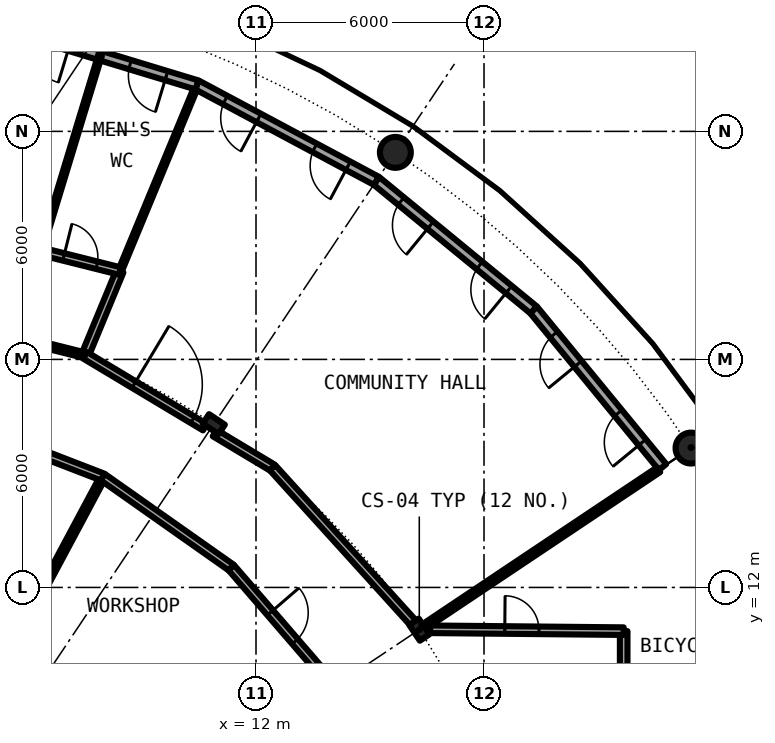
"""IFC4 building model, lengths in metres.
Left out: names, types, materials, properties, quantities, classifications, styles, units other than length and angle.
Written with IfcOpenShell. Run it as: python <this file> out.ifc"""

import sys

from ifc_helpers import new_model, si_unit, direction, frame, frame_2d, origin, origin_2d, place, context, subcontext, project, spatial, rectangle, hollow_circle, i_section, extrude, element, fill, save


model = new_model("IFC4")
c1 = context("Model", 3, precision=1e-05, world=origin(), true_north=direction((0.0, 1.0)))
c2 = subcontext(c1, "Body", "Model", "MODEL_VIEW")
j1 = project(units=[si_unit("LENGTHUNIT", "METRE"), si_unit("PLANEANGLEUNIT", "RADIAN")], contexts=[c1])
p1 = place(None, origin())
s1 = spatial("IfcSite", under=j1, at=p1, CompositionType="ELEMENT")
p2 = place(p1, origin())
s2 = spatial("IfcBuilding", under=s1, at=p2, CompositionType="ELEMENT")
p3 = place(p2, frame((0.0, 0.0, 157.4)))
s3 = spatial("IfcBuildingStorey", under=s2, at=p3, CompositionType="ELEMENT", Elevation=157.4)
for number, where, z_axis, x_axis in (
    (1, (23.448, 15.667, 0.0), (0.0, 0.0, 1.0), (1.0, 0.0, 0.0)),
    (2, (15.667, 23.448, 0.0), (0.0, 0.0, 1.0), (1.0, 0.0, 0.0)),
):
    element("IfcColumn", number, at=place(p3, frame(where, z_axis=z_axis, x_axis=x_axis)), inside=s3, PredefinedType="COLUMN", context=c2, shape_type="SweptSolid", body=[
        extrude(hollow_circle(Radius=0.406, WallThickness=0.04, at=origin_2d()), origin(), (0.0, 0.0, 1.0), 4.2),
    ])
for number, where, z_axis, x_axis in (
    (3, (16.297, 10.889, 0.0), (0.0, 0.0, 1.0), (0.831, 0.556, 0.0)),
    (4, (10.889, 16.297, 0.0), (0.0, 0.0, 1.0), (0.556, 0.831, 0.0)),
):
    element("IfcColumn", number, at=place(p3, frame(where, z_axis=z_axis, x_axis=x_axis)), inside=s3, PredefinedType="COLUMN", context=c2, shape_type="SweptSolid", body=[
        extrude(i_section(OverallWidth=0.3, OverallDepth=0.5, WebThickness=0.014, FlangeThickness=0.028, FilletRadius=0.027, at=origin_2d()), origin(), (0.0, 0.0, 1.0), 4.2),
    ])
p4 = place(p3, frame((22.699, 15.167, 0.0), z_axis=(0.0, 0.0, 1.0), x_axis=(-0.634382322723, 0.773019449054, 0.0)))
e5 = element("IfcWall", 5, at=p4, inside=s3, PredefinedType="SOLIDWALL", context=c2, shape_type="SweptSolid", body=[
    extrude(rectangle(XDim=5.352, YDim=0.25, at=frame_2d((2.676, 0.0))), origin(), (0.0, 0.0, 1.0), 3.85),
])
p5 = place(p4, frame((0.841, 0.0, 0.0)))
e6 = element("IfcOpeningElement", 6, at=p5, cuts=e5, PredefinedType="OPENING", context=c2, shape_type="SweptSolid", body=[
    extrude(rectangle(XDim=1.0, YDim=2.2, at=frame_2d((0.5, 1.1))), frame((0.0, 0.135, 0.0), z_axis=(0.0, -1.0, 0.0), x_axis=(1.0, 0.0, 0.0)), (0.0, 0.0, 1.0), 0.27),
])
p6 = place(p4, frame((3.51, 0.0, 0.0)))
e7 = element("IfcOpeningElement", 7, at=p6, cuts=e5, PredefinedType="OPENING", context=c2, shape_type="SweptSolid", body=[
    extrude(rectangle(XDim=1.0, YDim=2.2, at=frame_2d((0.5, 1.1))), frame((0.0, 0.135, 0.0), z_axis=(0.0, -1.0, 0.0), x_axis=(1.0, 0.0, 0.0)), (0.0, 0.0, 1.0), 0.27),
])
p7 = place(p3, frame((19.304, 19.304, 0.0), z_axis=(0.0, 0.0, 1.0), x_axis=(-0.773019449054, 0.634382322723, 0.0)))
e8 = element("IfcWall", 8, at=p7, inside=s3, PredefinedType="SOLIDWALL", context=c2, shape_type="SweptSolid", body=[
    extrude(rectangle(XDim=5.352, YDim=0.25, at=frame_2d((2.676, 0.0))), origin(), (0.0, 0.0, 1.0), 3.85),
])
p8 = place(p7, frame((0.841, 0.0, 0.0)))
e9 = element("IfcOpeningElement", 9, at=p8, cuts=e8, PredefinedType="OPENING", context=c2, shape_type="SweptSolid", body=[
    extrude(rectangle(XDim=1.0, YDim=2.2, at=frame_2d((0.5, 1.1))), frame((0.0, 0.135, 0.0), z_axis=(0.0, -1.0, 0.0), x_axis=(1.0, 0.0, 0.0)), (0.0, 0.0, 1.0), 0.27),
])
p9 = place(p7, frame((3.51, 0.0, 0.0)))
e10 = element("IfcOpeningElement", 10, at=p9, cuts=e8, PredefinedType="OPENING", context=c2, shape_type="SweptSolid", body=[
    extrude(rectangle(XDim=1.0, YDim=2.2, at=frame_2d((0.5, 1.1))), frame((0.0, 0.135, 0.0), z_axis=(0.0, -1.0, 0.0), x_axis=(1.0, 0.0, 0.0)), (0.0, 0.0, 1.0), 0.27),
])
p10 = place(p3, frame((15.167, 22.699, 0.0), z_axis=(0.0, 0.0, 1.0), x_axis=(-0.881915646801, 0.471407246368, 0.0)))
e11 = element("IfcWall", 11, at=p10, inside=s3, PredefinedType="SOLIDWALL", context=c2, shape_type="SweptSolid", body=[
    extrude(rectangle(XDim=5.352, YDim=0.25, at=frame_2d((2.676, 0.0))), origin(), (0.0, 0.0, 1.0), 3.85),
])
p11 = place(p10, frame((0.841, 0.0, 0.0)))
e12 = element("IfcOpeningElement", 12, at=p11, cuts=e11, PredefinedType="OPENING", context=c2, shape_type="SweptSolid", body=[
    extrude(rectangle(XDim=1.0, YDim=2.2, at=frame_2d((0.5, 1.1))), frame((0.0, 0.135, 0.0), z_axis=(0.0, -1.0, 0.0), x_axis=(1.0, 0.0, 0.0)), (0.0, 0.0, 1.0), 0.27),
])
p12 = place(p10, frame((3.51, 0.0, 0.0)))
e13 = element("IfcOpeningElement", 13, at=p12, cuts=e11, PredefinedType="OPENING", context=c2, shape_type="SweptSolid", body=[
    extrude(rectangle(XDim=1.0, YDim=2.2, at=frame_2d((0.5, 1.1))), frame((0.0, 0.135, 0.0), z_axis=(0.0, -1.0, 0.0), x_axis=(1.0, 0.0, 0.0)), (0.0, 0.0, 1.0), 0.27),
])
p13 = place(p3, frame((10.447, 25.222, 0.0), z_axis=(0.0, 0.0, 1.0), x_axis=(-0.956965678721, 0.290201119486, 0.0)))
e14 = element("IfcWall", 14, at=p13, inside=s3, PredefinedType="SOLIDWALL", context=c2, shape_type="SweptSolid", body=[
    extrude(rectangle(XDim=5.351, YDim=0.25, at=frame_2d((2.676, 0.0))), origin(), (0.0, 0.0, 1.0), 3.85),
])
p14 = place(p13, frame((0.841, 0.0, 0.0)))
e15 = element("IfcOpeningElement", 15, at=p14, cuts=e14, PredefinedType="OPENING", context=c2, shape_type="SweptSolid", body=[
    extrude(rectangle(XDim=1.0, YDim=2.2, at=frame_2d((0.5, 1.1))), frame((0.0, 0.135, 0.0), z_axis=(0.0, -1.0, 0.0), x_axis=(1.0, 0.0, 0.0)), (0.0, 0.0, 1.0), 0.27),
])
p15 = place(p13, frame((3.51, 0.0, 0.0)))
e16 = element("IfcOpeningElement", 16, at=p15, cuts=e14, PredefinedType="OPENING", context=c2, shape_type="SweptSolid", body=[
    extrude(rectangle(XDim=1.0, YDim=2.2, at=frame_2d((0.5, 1.1))), frame((0.0, 0.135, 0.0), z_axis=(0.0, -1.0, 0.0), x_axis=(1.0, 0.0, 0.0)), (0.0, 0.0, 1.0), 0.27),
])
p16 = place(p3, frame((21.675, 9.1, 0.0), z_axis=(0.0, 0.0, 1.0), x_axis=(0.0, 1.0, 0.0)))
e17 = element("IfcWall", 17, at=p16, inside=s3, PredefinedType="PARTITIONING", context=c2, shape_type="SweptSolid", body=[
    extrude(rectangle(XDim=1.75, YDim=0.2, at=frame_2d((0.875, 0.0))), origin(), (0.0, 0.0, 1.0), 3.85),
])
p17 = place(p3, frame((3.641, 6.807, 0.0), z_axis=(0.0, 0.0, 1.0), x_axis=(0.471428625665, 0.881904218667, 0.0)))
e18 = element("IfcWall", 18, at=p17, inside=s3, PredefinedType="PARTITIONING", context=c2, shape_type="SweptSolid", body=[
    extrude(rectangle(XDim=9.18, YDim=0.15, at=frame_2d((4.59, 0.0))), origin(), (0.0, 0.0, 1.0), 3.85),
])
p18 = place(p3, frame((6.331, 20.848, 0.0), z_axis=(0.0, 0.0, 1.0), x_axis=(0.290701687048, 0.956813737959, 0.0)))
e19 = element("IfcWall", 19, at=p18, inside=s3, PredefinedType="PARTITIONING", context=c2, shape_type="SweptSolid", body=[
    extrude(rectangle(XDim=5.387, YDim=0.1, at=frame_2d((2.693, 0.0))), origin(), (0.0, 0.0, 1.0), 3.85),
])
p19 = place(p3, frame((7.501, 18.108, 0.0), z_axis=(0.0, 0.0, 1.0), x_axis=(0.382555476978, 0.923932522988, 0.0)))
e20 = element("IfcWall", 20, at=p19, inside=s3, PredefinedType="PARTITIONING", context=c2, shape_type="SweptSolid", body=[
    extrude(rectangle(XDim=2.4, YDim=0.2, at=frame_2d((1.2, 0.0))), origin(), (0.0, 0.0, 1.0), 3.85),
])
p20 = place(p3, frame((8.419, 20.325, 0.0), z_axis=(0.0, 0.0, 1.0), x_axis=(0.382621247276, 0.923905287967, 0.0)))
e21 = element("IfcWall", 21, at=p20, inside=s3, PredefinedType="PARTITIONING", context=c2, shape_type="SweptSolid", body=[
    extrude(rectangle(XDim=5.175, YDim=0.1, at=frame_2d((2.587, 0.0))), origin(), (0.0, 0.0, 1.0), 3.85),
])
p21 = place(p3, frame((16.505, 11.028, 0.0), z_axis=(0.0, 0.0, 1.0), x_axis=(0.831434446288, 0.555622859075, 0.0)))
e22 = element("IfcWall", 22, at=p21, inside=s3, PredefinedType="PARTITIONING", context=c2, shape_type="SweptSolid", body=[
    extrude(rectangle(XDim=7.325, YDim=0.15, at=frame_2d((3.662, 0.0))), origin(), (0.0, 0.0, 1.0), 3.85),
])
p22 = place(p3, frame((16.582, 10.899, 0.0), z_axis=(0.0, 0.0, 1.0), x_axis=(0.999954045313, -0.009586827528, 0.0)))
e23 = element("IfcWall", 23, at=p22, inside=s3, PredefinedType="PARTITIONING", context=c2, shape_type="SweptSolid", body=[
    extrude(rectangle(XDim=5.093, YDim=0.2, at=frame_2d((2.547, 0.0))), origin(), (0.0, 0.0, 1.0), 3.85),
])
p23 = place(p22, frame((1.964, 0.0, 0.0)))
e24 = element("IfcOpeningElement", 24, at=p23, cuts=e23, PredefinedType="OPENING", context=c2, shape_type="SweptSolid", body=[
    extrude(rectangle(XDim=0.9, YDim=2.3, at=frame_2d((0.45, 1.15))), frame((0.0, 0.11, 0.0), z_axis=(0.0, -1.0, 0.0), x_axis=(1.0, 0.0, 0.0)), (0.0, 0.0, 1.0), 0.22),
])
p24 = place(p3, frame((4.106, 16.394, 0.0), z_axis=(0.0, 0.0, 1.0), x_axis=(0.932943640288, -0.360022449363, 0.0)))
e25 = element("IfcWall", 25, at=p24, inside=s3, PredefinedType="PARTITIONING", context=c2, shape_type="SweptSolid", body=[
    extrude(rectangle(XDim=4.139, YDim=0.2, at=frame_2d((2.069, 0.0))), origin(), (0.0, 0.0, 1.0), 3.85),
])
p25 = place(p24, frame((1.569, 0.0, 0.0)))
e26 = element("IfcOpeningElement", 26, at=p25, cuts=e25, PredefinedType="OPENING", context=c2, shape_type="SweptSolid", body=[
    extrude(rectangle(XDim=1.0, YDim=2.3, at=frame_2d((0.5, 1.15))), frame((0.0, 0.11, 0.0), z_axis=(0.0, -1.0, 0.0), x_axis=(1.0, 0.0, 0.0)), (0.0, 0.0, 1.0), 0.22),
])
p26 = place(p3, frame((7.967, 14.904, 0.0), z_axis=(0.0, 0.0, 1.0), x_axis=(0.817567680547, -0.575832517079, 0.0)))
e27 = element("IfcWall", 27, at=p26, inside=s3, PredefinedType="PARTITIONING", context=c2, shape_type="SweptSolid", body=[
    extrude(rectangle(XDim=4.137, YDim=0.2, at=frame_2d((2.068, 0.0))), origin(), (0.0, 0.0, 1.0), 3.85),
])
p27 = place(p3, frame((11.349, 12.522, 0.0), z_axis=(0.0, 0.0, 1.0), x_axis=(0.653273870261, -0.757121687996, 0.0)))
e28 = element("IfcWall", 28, at=p27, inside=s3, PredefinedType="PARTITIONING", context=c2, shape_type="SweptSolid", body=[
    extrude(rectangle(XDim=4.189, YDim=0.2, at=frame_2d((2.095, 0.0))), origin(), (0.0, 0.0, 1.0), 3.85),
])
p28 = place(p27, frame((1.569, 0.0, 0.0)))
e29 = element("IfcOpeningElement", 29, at=p28, cuts=e28, PredefinedType="OPENING", context=c2, shape_type="SweptSolid", body=[
    extrude(rectangle(XDim=1.0, YDim=2.3, at=frame_2d((0.5, 1.15))), frame((0.0, 0.11, 0.0), z_axis=(0.0, -1.0, 0.0), x_axis=(1.0, 0.0, 0.0)), (0.0, 0.0, 1.0), 0.22),
])
p29 = place(p3, frame((3.933, 19.002, 0.0), z_axis=(0.0, 0.0, 1.0), x_axis=(0.970009604092, -0.243066591637, 0.0)))
e30 = element("IfcWall", 30, at=p29, inside=s3, PredefinedType="PARTITIONING", context=c2, shape_type="SweptSolid", body=[
    extrude(rectangle(XDim=3.678, YDim=0.15, at=frame_2d((1.839, 0.0))), origin(), (0.0, 0.0, 1.0), 3.54),
])
p30 = place(p29, frame((0.476, 0.0, 0.0)))
e31 = element("IfcOpeningElement", 31, at=p30, cuts=e30, PredefinedType="OPENING", context=c2, shape_type="SweptSolid", body=[
    extrude(rectangle(XDim=1.0, YDim=2.3, at=frame_2d((0.5, 1.15))), frame((0.0, 0.085, 0.0), z_axis=(0.0, -1.0, 0.0), x_axis=(1.0, 0.0, 0.0)), (0.0, 0.0, 1.0), 0.17),
])
p31 = place(p3, frame((7.501, 18.108, 0.0), z_axis=(0.0, 0.0, 1.0), x_axis=(0.857750505244, -0.514066212421, 0.0)))
e32 = element("IfcWall", 32, at=p31, inside=s3, PredefinedType="PARTITIONING", context=c2, shape_type="SweptSolid", body=[
    extrude(rectangle(XDim=3.678, YDim=0.2, at=frame_2d((1.839, 0.0))), origin(), (0.0, 0.0, 1.0), 3.54),
])
p32 = place(p31, frame((1.5, 0.0, 0.0)))
e33 = element("IfcOpeningElement", 33, at=p32, cuts=e32, PredefinedType="OPENING", context=c2, shape_type="SweptSolid", body=[
    extrude(rectangle(XDim=1.8, YDim=2.3, at=frame_2d((0.9, 1.15))), frame((0.0, 0.11, 0.0), z_axis=(0.0, -1.0, 0.0), x_axis=(1.0, 0.0, 0.0)), (0.0, 0.0, 1.0), 0.22),
])
p33 = place(p3, frame((10.913, 16.063, 0.0), z_axis=(0.0, 0.0, 1.0), x_axis=(0.857614365469, -0.514293301668, 0.0)))
e34 = element("IfcWall", 34, at=p33, inside=s3, PredefinedType="PARTITIONING", context=c2, shape_type="SweptSolid", body=[
    extrude(rectangle(XDim=1.773, YDim=0.2, at=frame_2d((0.887, 0.0))), origin(), (0.0, 0.0, 1.0), 3.54),
])
p34 = place(p3, frame((12.434, 15.151, 0.0), z_axis=(0.0, 0.0, 1.0), x_axis=(0.671532887857, -0.740974750262, 0.0)))
e35 = element("IfcWall", 35, at=p34, inside=s3, PredefinedType="PARTITIONING", context=c2, shape_type="SweptSolid", body=[
    extrude(rectangle(XDim=5.601, YDim=0.2, at=frame_2d((2.8, 0.0))), origin(), (0.0, 0.0, 1.0), 3.54),
])
p35 = place(p3, frame((2.156, 21.894, 0.0), z_axis=(0.0, 0.0, 1.0), x_axis=(0.970020040157, -0.243024940478, 0.0)))
e36 = element("IfcWall", 36, at=p35, inside=s3, PredefinedType="PARTITIONING", context=c2, shape_type="SweptSolid", body=[
    extrude(rectangle(XDim=6.457, YDim=0.2, at=frame_2d((3.228, 0.0))), origin(), (0.0, 0.0, 1.0), 3.85),
])
p36 = place(p35, frame((4.93, 0.0, 0.0)))
e37 = element("IfcOpeningElement", 37, at=p36, cuts=e36, PredefinedType="OPENING", context=c2, shape_type="SweptSolid", body=[
    extrude(rectangle(XDim=0.9, YDim=2.3, at=frame_2d((0.45, 1.15))), frame((0.0, 0.11, 0.0), z_axis=(0.0, -1.0, 0.0), x_axis=(1.0, 0.0, 0.0)), (0.0, 0.0, 1.0), 0.22),
])
p37 = place(p35, frame((2.774, 0.0, 0.0)))
e38 = element("IfcOpeningElement", 38, at=p37, cuts=e36, PredefinedType="OPENING", context=c2, shape_type="SweptSolid", body=[
    extrude(rectangle(XDim=0.9, YDim=2.3, at=frame_2d((0.45, 1.15))), frame((0.0, 0.11, 0.0), z_axis=(0.0, -1.0, 0.0), x_axis=(1.0, 0.0, 0.0)), (0.0, 0.0, 1.0), 0.22),
])
p38 = place(p35, frame((0.625, 0.0, 0.0)))
e39 = element("IfcOpeningElement", 39, at=p38, cuts=e36, PredefinedType="OPENING", context=c2, shape_type="SweptSolid", body=[
    extrude(rectangle(XDim=0.9, YDim=2.3, at=frame_2d((0.45, 1.15))), frame((0.0, 0.11, 0.0), z_axis=(0.0, -1.0, 0.0), x_axis=(1.0, 0.0, 0.0)), (0.0, 0.0, 1.0), 0.22),
])
p39 = place(p5, origin())
e40 = element("IfcDoor", 40, at=p39, inside=s3, OperationType="SINGLE_SWING_LEFT", PredefinedType="DOOR", context=c2, shape_type="SweptSolid", body=[
    extrude(rectangle(XDim=1.0, YDim=2.2, at=frame_2d((0.5, 1.1))), frame((0.0, 0.025, 0.0), z_axis=(0.0, -1.0, 0.0), x_axis=(1.0, 0.0, 0.0)), (0.0, 0.0, 1.0), 0.05),
])
fill(e6, e40)
p40 = place(p6, origin())
e41 = element("IfcDoor", 41, at=p40, inside=s3, OperationType="SINGLE_SWING_LEFT", PredefinedType="DOOR", context=c2, shape_type="SweptSolid", body=[
    extrude(rectangle(XDim=1.0, YDim=2.2, at=frame_2d((0.5, 1.1))), frame((0.0, 0.025, 0.0), z_axis=(0.0, -1.0, 0.0), x_axis=(1.0, 0.0, 0.0)), (0.0, 0.0, 1.0), 0.05),
])
fill(e7, e41)
p41 = place(p8, origin())
e42 = element("IfcDoor", 42, at=p41, inside=s3, OperationType="SINGLE_SWING_LEFT", PredefinedType="DOOR", context=c2, shape_type="SweptSolid", body=[
    extrude(rectangle(XDim=1.0, YDim=2.2, at=frame_2d((0.5, 1.1))), frame((0.0, 0.025, 0.0), z_axis=(0.0, -1.0, 0.0), x_axis=(1.0, 0.0, 0.0)), (0.0, 0.0, 1.0), 0.05),
])
fill(e9, e42)
p42 = place(p9, origin())
e43 = element("IfcDoor", 43, at=p42, inside=s3, OperationType="SINGLE_SWING_LEFT", PredefinedType="DOOR", context=c2, shape_type="SweptSolid", body=[
    extrude(rectangle(XDim=1.0, YDim=2.2, at=frame_2d((0.5, 1.1))), frame((0.0, 0.025, 0.0), z_axis=(0.0, -1.0, 0.0), x_axis=(1.0, 0.0, 0.0)), (0.0, 0.0, 1.0), 0.05),
])
fill(e10, e43)
p43 = place(p11, origin())
e44 = element("IfcDoor", 44, at=p43, inside=s3, OperationType="SINGLE_SWING_LEFT", PredefinedType="DOOR", context=c2, shape_type="SweptSolid", body=[
    extrude(rectangle(XDim=1.0, YDim=2.2, at=frame_2d((0.5, 1.1))), frame((0.0, 0.025, 0.0), z_axis=(0.0, -1.0, 0.0), x_axis=(1.0, 0.0, 0.0)), (0.0, 0.0, 1.0), 0.05),
])
fill(e12, e44)
p44 = place(p12, origin())
e45 = element("IfcDoor", 45, at=p44, inside=s3, OperationType="SINGLE_SWING_LEFT", PredefinedType="DOOR", context=c2, shape_type="SweptSolid", body=[
    extrude(rectangle(XDim=1.0, YDim=2.2, at=frame_2d((0.5, 1.1))), frame((0.0, 0.025, 0.0), z_axis=(0.0, -1.0, 0.0), x_axis=(1.0, 0.0, 0.0)), (0.0, 0.0, 1.0), 0.05),
])
fill(e13, e45)
p45 = place(p14, origin())
e46 = element("IfcDoor", 46, at=p45, inside=s3, OperationType="SINGLE_SWING_LEFT", PredefinedType="DOOR", context=c2, shape_type="SweptSolid", body=[
    extrude(rectangle(XDim=1.0, YDim=2.2, at=frame_2d((0.5, 1.1))), frame((0.0, 0.025, 0.0), z_axis=(0.0, -1.0, 0.0), x_axis=(1.0, 0.0, 0.0)), (0.0, 0.0, 1.0), 0.05),
])
fill(e15, e46)
p46 = place(p36, origin())
e47 = element("IfcDoor", 47, at=p46, inside=s3, OperationType="SINGLE_SWING_RIGHT", PredefinedType="DOOR", context=c2, shape_type="SweptSolid", body=[
    extrude(rectangle(XDim=0.9, YDim=2.3, at=frame_2d((0.45, 1.15))), frame((0.0, 0.025, 0.0), z_axis=(0.0, -1.0, 0.0), x_axis=(1.0, 0.0, 0.0)), (0.0, 0.0, 1.0), 0.05),
])
fill(e37, e47)
p47 = place(p32, origin())
e48 = element("IfcDoor", 48, at=p47, inside=s3, OperationType="DOUBLE_DOOR_SINGLE_SWING", PredefinedType="DOOR", context=c2, shape_type="SweptSolid", body=[
    extrude(rectangle(XDim=1.8, YDim=2.3, at=frame_2d((0.9, 1.15))), frame((0.0, 0.025, 0.0), z_axis=(0.0, -1.0, 0.0), x_axis=(1.0, 0.0, 0.0)), (0.0, 0.0, 1.0), 0.05),
])
fill(e33, e48)
p48 = place(p28, origin())
e49 = element("IfcDoor", 49, at=p48, inside=s3, OperationType="SINGLE_SWING_LEFT", PredefinedType="DOOR", context=c2, shape_type="SweptSolid", body=[
    extrude(rectangle(XDim=1.0, YDim=2.3, at=frame_2d((0.5, 1.15))), frame((0.0, 0.025, 0.0), z_axis=(0.0, -1.0, 0.0), x_axis=(1.0, 0.0, 0.0)), (0.0, 0.0, 1.0), 0.05),
])
fill(e29, e49)
p49 = place(p23, origin())
e50 = element("IfcDoor", 50, at=p49, inside=s3, OperationType="SINGLE_SWING_LEFT", PredefinedType="DOOR", context=c2, shape_type="SweptSolid", body=[
    extrude(rectangle(XDim=0.9, YDim=2.3, at=frame_2d((0.45, 1.15))), frame((0.0, 0.025, 0.0), z_axis=(0.0, -1.0, 0.0), x_axis=(1.0, 0.0, 0.0)), (0.0, 0.0, 1.0), 0.05),
])
fill(e24, e50)
save(model, sys.argv[1])
